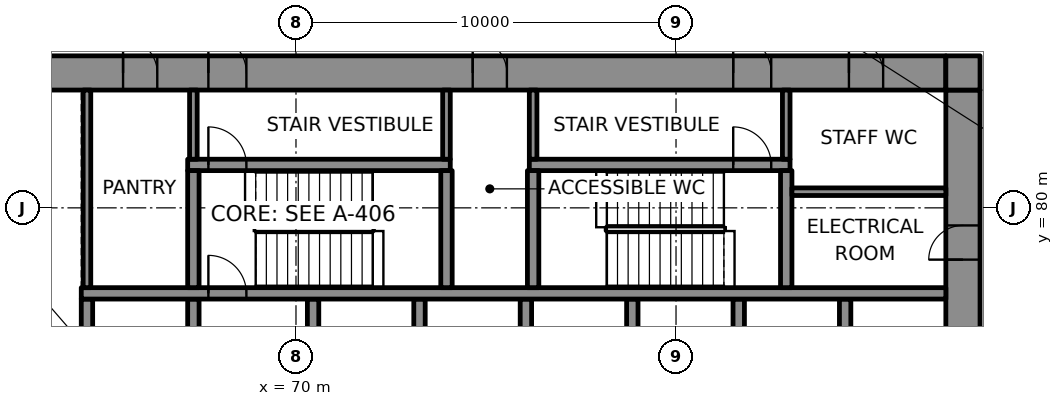
"""IFC4 building model, lengths in metres.
Left out: names, types, materials, properties, quantities, classifications, styles, units other than length and angle.
Written with IfcOpenShell. Run it as: python <this file> out.ifc"""

import sys

from ifc_helpers import new_model, si_unit, direction, frame, frame_2d, origin, place, context, subcontext, project, spatial, rectangle, extrude, element, fill, save


model = new_model("IFC4")
c1 = context("Model", 3, precision=1e-05, world=origin(), true_north=direction((0.0, 1.0)))
c2 = subcontext(c1, "Body", "Model", "MODEL_VIEW")
j1 = project(units=[si_unit("LENGTHUNIT", "METRE"), si_unit("PLANEANGLEUNIT", "RADIAN")], contexts=[c1])
p1 = place(None, origin())
s1 = spatial("IfcSite", under=j1, at=p1, CompositionType="ELEMENT")
p2 = place(p1, origin())
s2 = spatial("IfcBuilding", under=s1, at=p2, CompositionType="ELEMENT")
p3 = place(p2, frame((0.0, 0.0, 90.4)))
s3 = spatial("IfcBuildingStorey", under=s2, at=p3, CompositionType="ELEMENT", Elevation=90.4)
p4 = place(p3, frame((62.0, 83.55, 0.0), z_axis=(0.0, 0.0, 1.0), x_axis=(1.0, 0.0, 0.0)))
e1 = element("IfcWall", 1, at=p4, inside=s3, PredefinedType="SHEAR", context=c2, shape_type="SweptSolid", body=[
    extrude(rectangle(XDim=25.1, YDim=0.9, at=frame_2d((12.55, 0.0))), origin(), (0.0, 0.0, 1.0), 4.0),
])
p5 = place(p4, frame((5.695, 0.0, 0.0)))
e2 = element("IfcOpeningElement", 2, at=p5, cuts=e1, PredefinedType="OPENING", context=c2, shape_type="SweptSolid", body=[
    extrude(rectangle(XDim=1.0, YDim=2.1, at=frame_2d((0.5, 1.05))), frame((0.0, 0.46, 0.0), z_axis=(0.0, -1.0, 0.0), x_axis=(1.0, 0.0, 0.0)), (0.0, 0.0, 1.0), 0.92),
])
p6 = place(p4, frame((19.505, 0.0, 0.0)))
e3 = element("IfcOpeningElement", 3, at=p6, cuts=e1, PredefinedType="OPENING", context=c2, shape_type="SweptSolid", body=[
    extrude(rectangle(XDim=1.0, YDim=2.1, at=frame_2d((0.5, 1.05))), frame((0.0, 0.46, 0.0), z_axis=(0.0, -1.0, 0.0), x_axis=(1.0, 0.0, 0.0)), (0.0, 0.0, 1.0), 0.92),
])
p7 = place(p4, frame((3.45, 0.0, 0.0)))
e4 = element("IfcOpeningElement", 4, at=p7, cuts=e1, PredefinedType="OPENING", context=c2, shape_type="SweptSolid", body=[
    extrude(rectangle(XDim=0.9, YDim=2.1, at=frame_2d((0.45, 1.05))), frame((0.0, 0.46, 0.0), z_axis=(0.0, -1.0, 0.0), x_axis=(1.0, 0.0, 0.0)), (0.0, 0.0, 1.0), 0.92),
])
p8 = place(p4, frame((12.65, 0.0, 0.0)))
e5 = element("IfcOpeningElement", 5, at=p8, cuts=e1, PredefinedType="OPENING", context=c2, shape_type="SweptSolid", body=[
    extrude(rectangle(XDim=0.9, YDim=2.1, at=frame_2d((0.45, 1.05))), frame((0.0, 0.46, 0.0), z_axis=(0.0, -1.0, 0.0), x_axis=(1.0, 0.0, 0.0)), (0.0, 0.0, 1.0), 0.92),
])
p9 = place(p4, frame((22.55, 0.0, 0.0)))
e6 = element("IfcOpeningElement", 6, at=p9, cuts=e1, PredefinedType="OPENING", context=c2, shape_type="SweptSolid", body=[
    extrude(rectangle(XDim=0.9, YDim=2.1, at=frame_2d((0.45, 1.05))), frame((0.0, 0.46, 0.0), z_axis=(0.0, -1.0, 0.0), x_axis=(1.0, 0.0, 0.0)), (0.0, 0.0, 1.0), 0.92),
])
p10 = place(p3, frame((87.55, 66.9, 0.0), z_axis=(0.0, 0.0, 1.0), x_axis=(0.0, 1.0, 0.0)))
e7 = element("IfcWall", 7, at=p10, inside=s3, PredefinedType="SHEAR", context=c2, shape_type="SweptSolid", body=[
    extrude(rectangle(XDim=16.2, YDim=0.9, at=frame_2d((8.1, 0.0))), origin(), (0.0, 0.0, 1.0), 4.0),
])
p11 = place(p10, frame((5.5, 0.0, 0.0)))
e8 = element("IfcOpeningElement", 8, at=p11, cuts=e7, PredefinedType="OPENING", context=c2, shape_type="SweptSolid", body=[
    extrude(rectangle(XDim=1.8, YDim=2.1, at=frame_2d((0.9, 1.05))), frame((0.0, 0.46, 0.0), z_axis=(0.0, -1.0, 0.0), x_axis=(1.0, 0.0, 0.0)), (0.0, 0.0, 1.0), 0.92),
])
p12 = place(p10, frame((11.738, 0.0, 0.0)))
e9 = element("IfcOpeningElement", 9, at=p12, cuts=e7, PredefinedType="OPENING", context=c2, shape_type="SweptSolid", body=[
    extrude(rectangle(XDim=0.9, YDim=2.1, at=frame_2d((0.45, 1.05))), frame((0.0, 0.46, 0.0), z_axis=(0.0, -1.0, 0.0), x_axis=(1.0, 0.0, 0.0)), (0.0, 0.0, 1.0), 0.92),
])
for number, where, z_axis, x_axis in (
    (10, (64.5, 75.0, 0.0), (0.0, 0.0, 1.0), (0.0, 1.0, 0.0)),
    (11, (67.3, 75.0, 0.0), (0.0, 0.0, 1.0), (0.0, 1.0, 0.0)),
):
    element("IfcWall", number, at=place(p3, frame(where, z_axis=z_axis, x_axis=x_axis)), inside=s3, PredefinedType="SHEAR", context=c2, shape_type="SweptSolid", body=[
        extrude(rectangle(XDim=2.6, YDim=0.3, at=frame_2d((1.3, 0.0))), origin(), (0.0, 0.0, 1.0), 4.0),
    ])
p13 = place(p3, frame((70.45, 75.0, 0.0), z_axis=(0.0, 0.0, 1.0), x_axis=(0.0, 1.0, 0.0)))
e12 = element("IfcWall", 12, at=p13, inside=s3, PredefinedType="SHEAR", context=c2, shape_type="SweptSolid", body=[
    extrude(rectangle(XDim=2.6, YDim=0.3, at=frame_2d((1.3, 0.0))), origin(), (0.0, 0.0, 1.0), 4.0),
])
p14 = place(p13, frame((0.15, 0.0, 0.0)))
e13 = element("IfcOpeningElement", 13, at=p14, cuts=e12, PredefinedType="OPENING", context=c2, shape_type="SweptSolid", body=[
    extrude(rectangle(XDim=1.1, YDim=2.1, at=frame_2d((0.55, 1.05))), frame((0.0, 0.16, 0.0), z_axis=(0.0, -1.0, 0.0), x_axis=(1.0, 0.0, 0.0)), (0.0, 0.0, 1.0), 0.32),
])
for number, where, z_axis, x_axis in (
    (14, (73.25, 75.0, 0.0), (0.0, 0.0, 1.0), (0.0, 1.0, 0.0)),
    (15, (76.05, 75.0, 0.0), (0.0, 0.0, 1.0), (0.0, 1.0, 0.0)),
    (16, (78.85, 75.0, 0.0), (0.0, 0.0, 1.0), (0.0, 1.0, 0.0)),
    (17, (81.65, 75.0, 0.0), (0.0, 0.0, 1.0), (0.0, 1.0, 0.0)),
    (18, (84.45, 75.0, 0.0), (0.0, 0.0, 1.0), (0.0, 1.0, 0.0)),
):
    element("IfcWall", number, at=place(p3, frame(where, z_axis=z_axis, x_axis=x_axis)), inside=s3, PredefinedType="SHEAR", context=c2, shape_type="SweptSolid", body=[
        extrude(rectangle(XDim=2.6, YDim=0.3, at=frame_2d((1.3, 0.0))), origin(), (0.0, 0.0, 1.0), 4.0),
    ])
p15 = place(p3, frame((64.35, 77.75, 0.0), z_axis=(0.0, 0.0, 1.0), x_axis=(1.0, 0.0, 0.0)))
e19 = element("IfcWall", 19, at=p15, inside=s3, PredefinedType="SHEAR", context=c2, shape_type="SweptSolid", body=[
    extrude(rectangle(XDim=22.75, YDim=0.3, at=frame_2d((11.375, 0.0))), origin(), (0.0, 0.0, 1.0), 4.0),
])
p16 = place(p15, frame((3.345, 0.0, 0.0)))
e20 = element("IfcOpeningElement", 20, at=p16, cuts=e19, PredefinedType="OPENING", context=c2, shape_type="SweptSolid", body=[
    extrude(rectangle(XDim=1.0, YDim=2.1, at=frame_2d((0.5, 1.05))), frame((0.0, 0.16, 0.0), z_axis=(0.0, -1.0, 0.0), x_axis=(1.0, 0.0, 0.0)), (0.0, 0.0, 1.0), 0.32),
])
p17 = place(p3, frame((67.15, 81.13, 0.0), z_axis=(0.0, 0.0, 1.0), x_axis=(1.0, 0.0, 0.0)))
e21 = element("IfcWall", 21, at=p17, inside=s3, PredefinedType="SHEAR", context=c2, shape_type="SweptSolid", body=[
    extrude(rectangle(XDim=6.91, YDim=0.3, at=frame_2d((3.455, 0.0))), origin(), (0.0, 0.0, 1.0), 4.0),
])
p18 = place(p17, frame((0.545, 0.0, 0.0)))
e22 = element("IfcOpeningElement", 22, at=p18, cuts=e21, PredefinedType="OPENING", context=c2, shape_type="SweptSolid", body=[
    extrude(rectangle(XDim=1.0, YDim=2.1, at=frame_2d((0.5, 1.05))), frame((0.0, 0.16, 0.0), z_axis=(0.0, -1.0, 0.0), x_axis=(1.0, 0.0, 0.0)), (0.0, 0.0, 1.0), 0.32),
])
p19 = place(p3, frame((76.14, 81.13, 0.0), z_axis=(0.0, 0.0, 1.0), x_axis=(1.0, 0.0, 0.0)))
e23 = element("IfcWall", 23, at=p19, inside=s3, PredefinedType="SHEAR", context=c2, shape_type="SweptSolid", body=[
    extrude(rectangle(XDim=6.86, YDim=0.3, at=frame_2d((3.43, 0.0))), origin(), (0.0, 0.0, 1.0), 4.0),
])
p20 = place(p19, frame((5.365, 0.0, 0.0)))
e24 = element("IfcOpeningElement", 24, at=p20, cuts=e23, PredefinedType="OPENING", context=c2, shape_type="SweptSolid", body=[
    extrude(rectangle(XDim=1.0, YDim=2.1, at=frame_2d((0.5, 1.05))), frame((0.0, 0.16, 0.0), z_axis=(0.0, -1.0, 0.0), x_axis=(1.0, 0.0, 0.0)), (0.0, 0.0, 1.0), 0.32),
])
for number, where, z_axis, x_axis in (
    (25, (67.3, 77.9, 0.0), (0.0, 0.0, 1.0), (0.0, 1.0, 0.0)),
    (26, (73.96, 77.9, 0.0), (0.0, 0.0, 1.0), (0.0, 1.0, 0.0)),
    (27, (76.24, 77.9, 0.0), (0.0, 0.0, 1.0), (0.0, 1.0, 0.0)),
    (28, (82.9, 77.9, 0.0), (0.0, 0.0, 1.0), (0.0, 1.0, 0.0)),
):
    element("IfcWall", number, at=place(p3, frame(where, z_axis=z_axis, x_axis=x_axis)), inside=s3, PredefinedType="SHEAR", context=c2, shape_type="SweptSolid", body=[
        extrude(rectangle(XDim=3.08, YDim=0.3, at=frame_2d((1.54, 0.0))), origin(), (0.0, 0.0, 1.0), 4.0),
    ])
p21 = place(p3, frame((87.1, 83.55, 0.0), z_axis=(0.0, 0.0, 1.0), x_axis=(1.0, 0.0, 0.0)))
e29 = element("IfcWall", 29, at=p21, inside=s3, PredefinedType="SHEAR", context=c2, shape_type="SweptSolid", body=[
    extrude(rectangle(XDim=0.9, YDim=0.9, at=frame_2d((0.45, 0.0))), origin(), (0.0, 0.0, 1.0), 4.0),
])
p22 = place(p3, frame((83.05, 80.425, 0.0), z_axis=(0.0, 0.0, 1.0), x_axis=(1.0, 0.0, 0.0)))
e30 = element("IfcWall", 30, at=p22, inside=s3, PredefinedType="PARTITIONING", context=c2, shape_type="SweptSolid", body=[
    extrude(rectangle(XDim=4.05, YDim=0.2, at=frame_2d((2.025, 0.0))), origin(), (0.0, 0.0, 1.0), 4.0),
])
p23 = place(p3, frame((64.5, 77.9, 0.0), z_axis=(0.0, 0.0, 1.0), x_axis=(0.0, 1.0, 0.0)))
e31 = element("IfcWall", 31, at=p23, inside=s3, PredefinedType="PARTITIONING", context=c2, shape_type="SweptSolid", body=[
    extrude(rectangle(XDim=5.2, YDim=0.2, at=frame_2d((2.6, 0.0))), origin(), (0.0, 0.0, 1.0), 4.0),
])
for number, where, z_axis, x_axis in (
    (32, (67.3, 81.28, 0.0), (0.0, 0.0, 1.0), (0.0, 1.0, 0.0)),
    (33, (73.96, 81.28, 0.0), (0.0, 0.0, 1.0), (0.0, 1.0, 0.0)),
    (34, (76.24, 81.28, 0.0), (0.0, 0.0, 1.0), (0.0, 1.0, 0.0)),
    (35, (82.9, 81.28, 0.0), (0.0, 0.0, 1.0), (0.0, 1.0, 0.0)),
):
    element("IfcWall", number, at=place(p3, frame(where, z_axis=z_axis, x_axis=x_axis)), inside=s3, PredefinedType="PARTITIONING", context=c2, shape_type="SweptSolid", body=[
        extrude(rectangle(XDim=1.82, YDim=0.2, at=frame_2d((0.91, 0.0))), origin(), (0.0, 0.0, 1.0), 4.0),
    ])
p24 = place(p16, origin())
e36 = element("IfcDoor", 36, at=p24, inside=s3, OperationType="SINGLE_SWING_LEFT", PredefinedType="DOOR", context=c2, shape_type="SweptSolid", body=[
    extrude(rectangle(XDim=1.0, YDim=2.1, at=frame_2d((0.5, 1.05))), frame((0.0, 0.025, 0.0), z_axis=(0.0, -1.0, 0.0), x_axis=(1.0, 0.0, 0.0)), (0.0, 0.0, 1.0), 0.05),
])
fill(e20, e36)
p25 = place(p18, origin())
e37 = element("IfcDoor", 37, at=p25, inside=s3, OperationType="SINGLE_SWING_RIGHT", PredefinedType="DOOR", context=c2, shape_type="SweptSolid", body=[
    extrude(rectangle(XDim=1.0, YDim=2.1, at=frame_2d((0.5, 1.05))), frame((0.0, 0.025, 0.0), z_axis=(0.0, -1.0, 0.0), x_axis=(1.0, 0.0, 0.0)), (0.0, 0.0, 1.0), 0.05),
])
fill(e22, e37)
p26 = place(p5, origin())
e38 = element("IfcDoor", 38, at=p26, inside=s3, OperationType="SINGLE_SWING_LEFT", PredefinedType="DOOR", context=c2, shape_type="SweptSolid", body=[
    extrude(rectangle(XDim=1.0, YDim=2.1, at=frame_2d((0.5, 1.05))), frame((0.0, 0.17, 0.0), z_axis=(0.0, -1.0, 0.0), x_axis=(1.0, 0.0, 0.0)), (0.0, 0.0, 1.0), 0.34),
])
fill(e2, e38)
p27 = place(p20, origin())
e39 = element("IfcDoor", 39, at=p27, inside=s3, OperationType="SINGLE_SWING_RIGHT", PredefinedType="DOOR", context=c2, shape_type="SweptSolid", body=[
    extrude(rectangle(XDim=1.0, YDim=2.1, at=frame_2d((0.5, 1.05))), frame((0.0, 0.025, 0.0), z_axis=(0.0, -1.0, 0.0), x_axis=(1.0, 0.0, 0.0)), (0.0, 0.0, 1.0), 0.05),
])
fill(e24, e39)
p28 = place(p6, origin())
e40 = element("IfcDoor", 40, at=p28, inside=s3, OperationType="SINGLE_SWING_LEFT", PredefinedType="DOOR", context=c2, shape_type="SweptSolid", body=[
    extrude(rectangle(XDim=1.0, YDim=2.1, at=frame_2d((0.5, 1.05))), frame((0.0, 0.17, 0.0), z_axis=(0.0, -1.0, 0.0), x_axis=(1.0, 0.0, 0.0)), (0.0, 0.0, 1.0), 0.34),
])
fill(e3, e40)
p29 = place(p7, origin())
e41 = element("IfcDoor", 41, at=p29, inside=s3, OperationType="SINGLE_SWING_RIGHT", PredefinedType="DOOR", context=c2, shape_type="SweptSolid", body=[
    extrude(rectangle(XDim=0.9, YDim=2.1, at=frame_2d((0.45, 1.05))), frame((0.0, 0.17, 0.0), z_axis=(0.0, -1.0, 0.0), x_axis=(1.0, 0.0, 0.0)), (0.0, 0.0, 1.0), 0.34),
])
fill(e4, e41)
p30 = place(p8, origin())
e42 = element("IfcDoor", 42, at=p30, inside=s3, OperationType="SINGLE_SWING_LEFT", PredefinedType="DOOR", context=c2, shape_type="SweptSolid", body=[
    extrude(rectangle(XDim=0.9, YDim=2.1, at=frame_2d((0.45, 1.05))), frame((0.0, 0.17, 0.0), z_axis=(0.0, -1.0, 0.0), x_axis=(1.0, 0.0, 0.0)), (0.0, 0.0, 1.0), 0.34),
])
fill(e5, e42)
p31 = place(p12, origin())
e43 = element("IfcDoor", 43, at=p31, inside=s3, OperationType="SINGLE_SWING_RIGHT", PredefinedType="DOOR", context=c2, shape_type="SweptSolid", body=[
    extrude(rectangle(XDim=0.9, YDim=2.1, at=frame_2d((0.45, 1.05))), frame((0.0, 0.17, 0.0), z_axis=(0.0, -1.0, 0.0), x_axis=(1.0, 0.0, 0.0)), (0.0, 0.0, 1.0), 0.34),
])
fill(e9, e43)
p32 = place(p9, origin())
e44 = element("IfcDoor", 44, at=p32, inside=s3, OperationType="SINGLE_SWING_LEFT", PredefinedType="DOOR", context=c2, shape_type="SweptSolid", body=[
    extrude(rectangle(XDim=0.9, YDim=2.1, at=frame_2d((0.45, 1.05))), frame((0.0, 0.17, 0.0), z_axis=(0.0, -1.0, 0.0), x_axis=(1.0, 0.0, 0.0)), (0.0, 0.0, 1.0), 0.34),
])
fill(e6, e44)
save(model, sys.argv[1])
